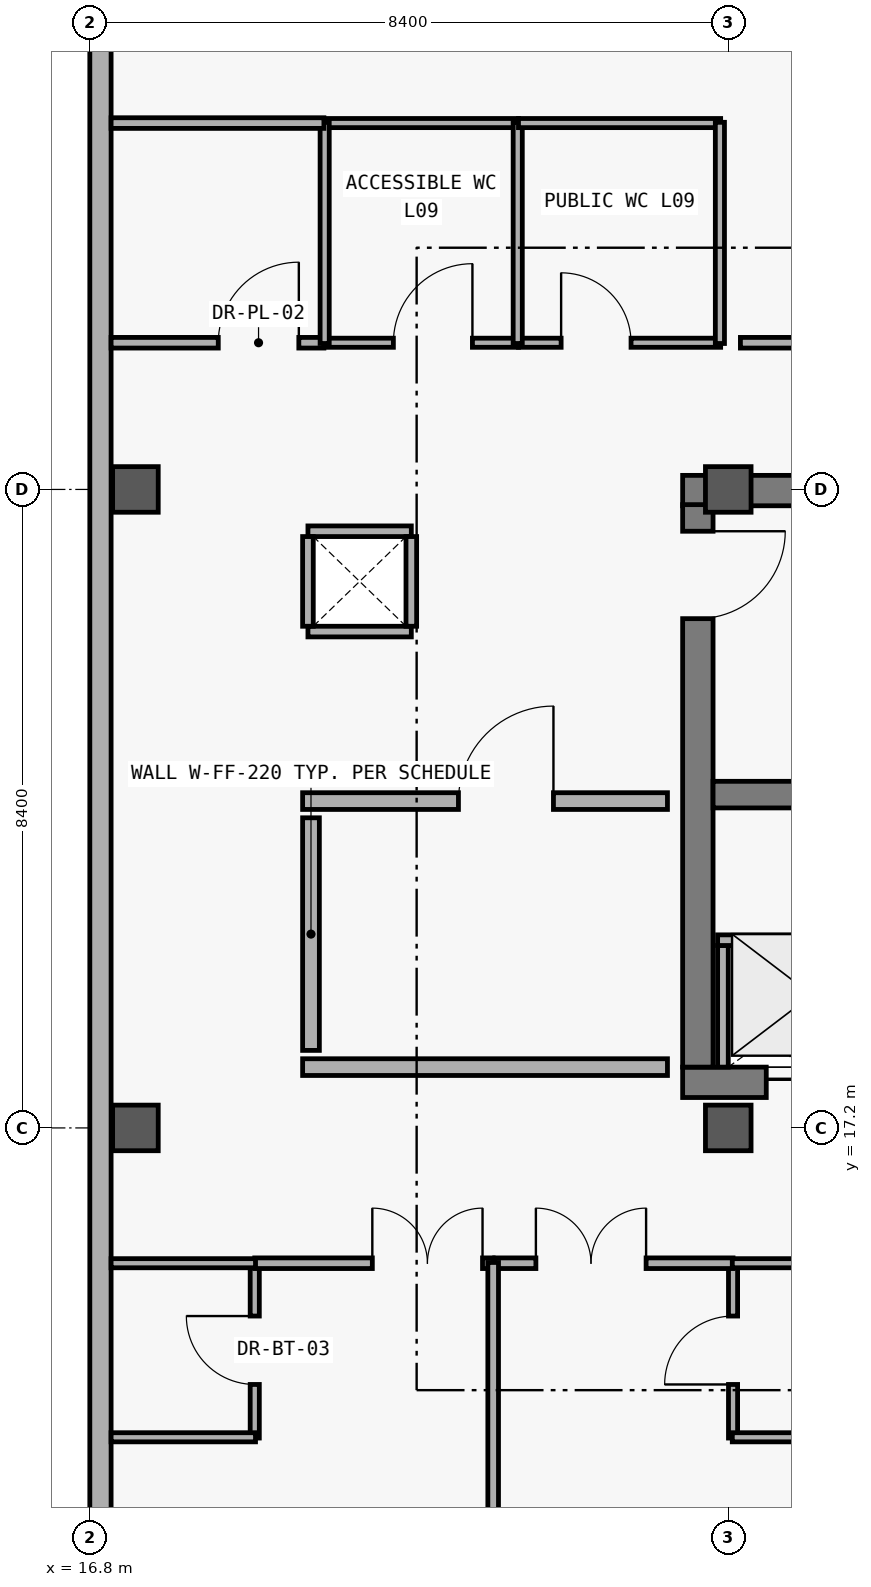
"""IFC4 building model, lengths in metres.
Left out: names, types, materials, properties, quantities, classifications, styles, units other than length and angle.
Written with IfcOpenShell. Run it as: python <this file> out.ifc"""

import sys

from ifc_helpers import new_model, si_unit, direction, frame, frame_2d, origin, origin_2d, place, context, subcontext, project, spatial, rectangle, extrude, element, fill, save


model = new_model("IFC4")
c1 = context("Model", 3, precision=1e-05, world=origin(), true_north=direction((0.0, 1.0)))
c2 = subcontext(c1, "Body", "Model", "MODEL_VIEW")
j1 = project(units=[si_unit("LENGTHUNIT", "METRE"), si_unit("PLANEANGLEUNIT", "RADIAN")], contexts=[c1])
p1 = place(None, origin())
s1 = spatial("IfcSite", under=j1, at=p1, CompositionType="ELEMENT")
p2 = place(p1, origin())
s2 = spatial("IfcBuilding", under=s1, at=p2, CompositionType="ELEMENT")
p3 = place(p2, frame((0.0, 0.0, 37.2)))
s3 = spatial("IfcBuildingStorey", under=s2, at=p3, CompositionType="ELEMENT", Elevation=37.2)
for number, where, z_axis, x_axis in (
    (1, (17.4, 17.2, 0.0), (0.0, 0.0, 1.0), (1.0, 0.0, 0.0)),
    (2, (17.4, 25.6, 0.0), (0.0, 0.0, 1.0), (1.0, 0.0, 0.0)),
    (3, (25.2, 17.2, 0.0), (0.0, 0.0, 1.0), (1.0, 0.0, 0.0)),
    (4, (25.2, 25.6, 0.0), (0.0, 0.0, 1.0), (1.0, 0.0, 0.0)),
):
    element("IfcColumn", number, at=place(p3, frame(where, z_axis=z_axis, x_axis=x_axis)), inside=s3, PredefinedType="COLUMN", context=c2, shape_type="SweptSolid", body=[
        extrude(rectangle(XDim=0.6, YDim=0.6, at=origin_2d()), origin(), (0.0, 0.0, 1.0), 3.6),
    ])
p4 = place(p3, frame((16.94, 8.8, 0.0), z_axis=(0.0, 0.0, 1.0), x_axis=(0.0, 1.0, 0.0)))
e5 = element("IfcWall", 5, at=p4, inside=s3, PredefinedType="SOLIDWALL", context=c2, shape_type="SweptSolid", body=[
    extrude(rectangle(XDim=25.2, YDim=0.28, at=frame_2d((12.6, 0.0))), origin(), (0.0, 0.0, 1.0), 3.34),
])
p5 = place(p4, frame((1.7, 0.0, 0.95)))
e6 = element("IfcOpeningElement", 6, at=p5, cuts=e5, PredefinedType="OPENING", context=c2, shape_type="SweptSolid", body=[
    extrude(rectangle(XDim=1.6, YDim=1.6, at=frame_2d((0.8, 0.8))), frame((0.0, 0.15, 0.0), z_axis=(0.0, -1.0, 0.0), x_axis=(1.0, 0.0, 0.0)), (0.0, 0.0, 1.0), 0.3),
])
p6 = place(p3, frame((24.6, 17.8, 0.0), z_axis=(0.0, 0.0, 1.0), x_axis=(1.0, 0.0, 0.0)))
e7 = element("IfcWall", 7, at=p6, inside=s3, PredefinedType="SHEAR", context=c2, shape_type="SweptSolid", body=[
    extrude(rectangle(XDim=9.2, YDim=0.4, at=frame_2d((4.6, 0.0))), origin(), (0.0, 0.0, 1.0), 3.32),
])
p7 = place(p6, frame((1.1, 0.0, 0.0)))
e8 = element("IfcOpeningElement", 8, at=p7, cuts=e7, PredefinedType="OPENING", context=c2, shape_type="SweptSolid", body=[
    extrude(rectangle(XDim=1.2, YDim=2.2, at=frame_2d((0.6, 1.1))), frame((0.0, 0.21, 0.0), z_axis=(0.0, -1.0, 0.0), x_axis=(1.0, 0.0, 0.0)), (0.0, 0.0, 1.0), 0.42),
])
p8 = place(p6, frame((3.5, 0.0, 0.0)))
e9 = element("IfcOpeningElement", 9, at=p8, cuts=e7, PredefinedType="OPENING", context=c2, shape_type="SweptSolid", body=[
    extrude(rectangle(XDim=1.1, YDim=2.2, at=frame_2d((0.55, 1.1))), frame((0.0, 0.21, 0.0), z_axis=(0.0, -1.0, 0.0), x_axis=(1.0, 0.0, 0.0)), (0.0, 0.0, 1.0), 0.42),
])
p9 = place(p6, frame((5.9, 0.0, 0.0)))
e10 = element("IfcOpeningElement", 10, at=p9, cuts=e7, PredefinedType="OPENING", context=c2, shape_type="SweptSolid", body=[
    extrude(rectangle(XDim=1.1, YDim=2.2, at=frame_2d((0.55, 1.1))), frame((0.0, 0.21, 0.0), z_axis=(0.0, -1.0, 0.0), x_axis=(1.0, 0.0, 0.0)), (0.0, 0.0, 1.0), 0.42),
])
p10 = place(p3, frame((33.8, 25.585, 0.0), z_axis=(0.0, 0.0, 1.0), x_axis=(-1.0, 0.0, 0.0)))
e11 = element("IfcWall", 11, at=p10, inside=s3, PredefinedType="SHEAR", context=c2, shape_type="SweptSolid", body=[
    extrude(rectangle(XDim=9.2, YDim=0.4, at=frame_2d((4.6, 0.0))), origin(), (0.0, 0.0, 1.0), 3.32),
])
p11 = place(p3, frame((24.8, 25.4, 0.0), z_axis=(0.0, 0.0, 1.0), x_axis=(0.0, -1.0, 0.0)))
e12 = element("IfcWall", 12, at=p11, inside=s3, PredefinedType="SHEAR", context=c2, shape_type="SweptSolid", body=[
    extrude(rectangle(XDim=7.4, YDim=0.4, at=frame_2d((3.7, 0.0))), origin(), (0.0, 0.0, 1.0), 3.32),
])
p12 = place(p11, frame((0.35, 0.0, 0.0)))
e13 = element("IfcOpeningElement", 13, at=p12, cuts=e12, PredefinedType="OPENING", context=c2, shape_type="SweptSolid", body=[
    extrude(rectangle(XDim=1.15, YDim=2.2, at=frame_2d((0.575, 1.1))), frame((0.0, 0.21, 0.0), z_axis=(0.0, -1.0, 0.0), x_axis=(1.0, 0.0, 0.0)), (0.0, 0.0, 1.0), 0.42),
])
p13 = place(p3, frame((25.0, 21.585, 0.0), z_axis=(0.0, 0.0, 1.0), x_axis=(1.0, 0.0, 0.0)))
e14 = element("IfcWall", 14, at=p13, inside=s3, PredefinedType="SHEAR", context=c2, shape_type="SweptSolid", body=[
    extrude(rectangle(XDim=8.4, YDim=0.35, at=frame_2d((4.2, 0.0))), origin(), (0.0, 0.0, 1.0), 3.32),
])
p14 = place(p3, frame((25.13, 18.0, 0.0), z_axis=(0.0, 0.0, 1.0), x_axis=(0.0, 1.0, 0.0)))
e15 = element("IfcWall", 15, at=p14, inside=s3, PredefinedType="PARTITIONING", context=c2, shape_type="SweptSolid", body=[
    extrude(rectangle(XDim=1.6, YDim=0.14, at=frame_2d((0.8, 0.0))), origin(), (0.0, 0.0, 1.0), 2.47),
])
p15 = place(p3, frame((25.06, 19.67, 0.0), z_axis=(0.0, 0.0, 1.0), x_axis=(1.0, 0.0, 0.0)))
e16 = element("IfcWall", 16, at=p15, inside=s3, PredefinedType="PARTITIONING", context=c2, shape_type="SweptSolid", body=[
    extrude(rectangle(XDim=7.18, YDim=0.14, at=frame_2d((3.59, 0.0))), origin(), (0.0, 0.0, 1.0), 2.47),
])
p16 = place(p3, frame((19.6, 18.0, 0.0), z_axis=(0.0, 0.0, 1.0), x_axis=(1.0, 0.0, 0.0)))
e17 = element("IfcWall", 17, at=p16, inside=s3, PredefinedType="SOLIDWALL", context=c2, shape_type="SweptSolid", body=[
    extrude(rectangle(XDim=4.8, YDim=0.22, at=frame_2d((2.4, 0.0))), origin(), (0.0, 0.0, 1.0), 2.47),
])
p17 = place(p3, frame((19.6, 21.5, 0.0), z_axis=(0.0, 0.0, 1.0), x_axis=(1.0, 0.0, 0.0)))
e18 = element("IfcWall", 18, at=p17, inside=s3, PredefinedType="SOLIDWALL", context=c2, shape_type="SweptSolid", body=[
    extrude(rectangle(XDim=4.8, YDim=0.22, at=frame_2d((2.4, 0.0))), origin(), (0.0, 0.0, 1.0), 2.47),
])
p18 = place(p17, frame((2.05, 0.0, 0.0)))
e19 = element("IfcOpeningElement", 19, at=p18, cuts=e18, PredefinedType="OPENING", context=c2, shape_type="SweptSolid", body=[
    extrude(rectangle(XDim=1.25, YDim=2.2, at=frame_2d((0.625, 1.1))), frame((0.0, 0.12, 0.0), z_axis=(0.0, -1.0, 0.0), x_axis=(1.0, 0.0, 0.0)), (0.0, 0.0, 1.0), 0.24),
])
p19 = place(p3, frame((19.71, 18.22, 0.0), z_axis=(0.0, 0.0, 1.0), x_axis=(0.0, 1.0, 0.0)))
e20 = element("IfcWall", 20, at=p19, inside=s3, PredefinedType="SOLIDWALL", context=c2, shape_type="SweptSolid", body=[
    extrude(rectangle(XDim=3.06, YDim=0.22, at=frame_2d((1.53, 0.0))), origin(), (0.0, 0.0, 1.0), 2.47),
])
p20 = place(p3, frame((18.97, 13.12, 0.0), z_axis=(0.0, 0.0, 1.0), x_axis=(0.0, 1.0, 0.0)))
e21 = element("IfcWall", 21, at=p20, inside=s3, PredefinedType="PARTITIONING", context=c2, shape_type="SweptSolid", body=[
    extrude(rectangle(XDim=2.31, YDim=0.12, at=frame_2d((1.155, 0.0))), origin(), (0.0, 0.0, 1.0), 2.48),
])
p21 = place(p20, frame((0.705, 0.0, 0.0)))
e22 = element("IfcOpeningElement", 22, at=p21, cuts=e21, PredefinedType="OPENING", context=c2, shape_type="SweptSolid", body=[
    extrude(rectangle(XDim=0.9, YDim=2.18, at=frame_2d((0.45, 1.09))), frame((0.0, 0.07, 0.0), z_axis=(0.0, -1.0, 0.0), x_axis=(1.0, 0.0, 0.0)), (0.0, 0.0, 1.0), 0.14),
])
p22 = place(p3, frame((25.263, 13.12, 0.0), z_axis=(0.0, 0.0, 1.0), x_axis=(0.0, 1.0, 0.0)))
e23 = element("IfcWall", 23, at=p22, inside=s3, PredefinedType="PARTITIONING", context=c2, shape_type="SweptSolid", body=[
    extrude(rectangle(XDim=2.31, YDim=0.12, at=frame_2d((1.155, 0.0))), origin(), (0.0, 0.0, 1.0), 2.48),
])
p23 = place(p22, frame((0.705, 0.0, 0.0)))
e24 = element("IfcOpeningElement", 24, at=p23, cuts=e23, PredefinedType="OPENING", context=c2, shape_type="SweptSolid", body=[
    extrude(rectangle(XDim=0.9, YDim=2.18, at=frame_2d((0.45, 1.09))), frame((0.0, 0.07, 0.0), z_axis=(0.0, -1.0, 0.0), x_axis=(1.0, 0.0, 0.0)), (0.0, 0.0, 1.0), 0.14),
])
p24 = place(p3, frame((19.88, 27.53, 0.0), z_axis=(0.0, 0.0, 1.0), x_axis=(1.0, 0.0, 0.0)))
e25 = element("IfcWall", 25, at=p24, inside=s3, PredefinedType="PARTITIONING", context=c2, shape_type="SweptSolid", body=[
    extrude(rectangle(XDim=2.56, YDim=0.12, at=frame_2d((1.28, 0.0))), origin(), (0.0, 0.0, 1.0), 2.48),
])
p25 = place(p24, frame((0.914, 0.0, 0.0)))
e26 = element("IfcOpeningElement", 26, at=p25, cuts=e25, PredefinedType="OPENING", context=c2, shape_type="SweptSolid", body=[
    extrude(rectangle(XDim=1.04, YDim=2.15, at=frame_2d((0.52, 1.075))), frame((0.0, 0.07, 0.0), z_axis=(0.0, -1.0, 0.0), x_axis=(1.0, 0.0, 0.0)), (0.0, 0.0, 1.0), 0.14),
])
p26 = place(p3, frame((22.44, 27.53, 0.0), z_axis=(0.0, 0.0, 1.0), x_axis=(1.0, 0.0, 0.0)))
e27 = element("IfcWall", 27, at=p26, inside=s3, PredefinedType="PARTITIONING", context=c2, shape_type="SweptSolid", body=[
    extrude(rectangle(XDim=2.66, YDim=0.12, at=frame_2d((1.33, 0.0))), origin(), (0.0, 0.0, 1.0), 2.48),
])
p27 = place(p26, frame((0.561, 0.0, 0.0)))
e28 = element("IfcOpeningElement", 28, at=p27, cuts=e27, PredefinedType="OPENING", context=c2, shape_type="SweptSolid", body=[
    extrude(rectangle(XDim=0.92, YDim=2.15, at=frame_2d((0.46, 1.075))), frame((0.0, 0.07, 0.0), z_axis=(0.0, -1.0, 0.0), x_axis=(1.0, 0.0, 0.0)), (0.0, 0.0, 1.0), 0.14),
])
p28 = place(p3, frame((18.97, 15.42, 0.0), z_axis=(0.0, 0.0, 1.0), x_axis=(1.0, 0.0, 0.0)))
e29 = element("IfcWall", 29, at=p28, inside=s3, PredefinedType="PARTITIONING", context=c2, shape_type="SweptSolid", body=[
    extrude(rectangle(XDim=3.137, YDim=0.14, at=frame_2d((1.568, 0.0))), origin(), (0.0, 0.0, 1.0), 2.48),
])
p29 = place(p28, frame((1.547, 0.0, 0.0)))
e30 = element("IfcOpeningElement", 30, at=p29, cuts=e29, PredefinedType="OPENING", context=c2, shape_type="SweptSolid", body=[
    extrude(rectangle(XDim=1.45, YDim=2.3, at=frame_2d((0.725, 1.15))), frame((0.0, 0.08, 0.0), z_axis=(0.0, -1.0, 0.0), x_axis=(1.0, 0.0, 0.0)), (0.0, 0.0, 1.0), 0.16),
])
p30 = place(p3, frame((22.127, 15.42, 0.0), z_axis=(0.0, 0.0, 1.0), x_axis=(1.0, 0.0, 0.0)))
e31 = element("IfcWall", 31, at=p30, inside=s3, PredefinedType="PARTITIONING", context=c2, shape_type="SweptSolid", body=[
    extrude(rectangle(XDim=3.136, YDim=0.14, at=frame_2d((1.568, 0.0))), origin(), (0.0, 0.0, 1.0), 2.48),
])
p31 = place(p30, frame((0.542, 0.0, 0.0)))
e32 = element("IfcOpeningElement", 32, at=p31, cuts=e31, PredefinedType="OPENING", context=c2, shape_type="SweptSolid", body=[
    extrude(rectangle(XDim=1.45, YDim=2.3, at=frame_2d((0.725, 1.15))), frame((0.0, 0.08, 0.0), z_axis=(0.0, -1.0, 0.0), x_axis=(1.0, 0.0, 0.0)), (0.0, 0.0, 1.0), 0.16),
])
p32 = place(p3, frame((17.08, 27.53, 0.0), z_axis=(0.0, 0.0, 1.0), x_axis=(1.0, 0.0, 0.0)))
e33 = element("IfcWall", 33, at=p32, inside=s3, PredefinedType="PARTITIONING", context=c2, shape_type="SweptSolid", body=[
    extrude(rectangle(XDim=2.8, YDim=0.14, at=frame_2d((1.4, 0.0))), origin(), (0.0, 0.0, 1.0), 2.48),
])
p33 = place(p32, frame((1.41, 0.0, 0.0)))
e34 = element("IfcOpeningElement", 34, at=p33, cuts=e33, PredefinedType="OPENING", context=c2, shape_type="SweptSolid", body=[
    extrude(rectangle(XDim=1.06, YDim=2.2, at=frame_2d((0.53, 1.1))), frame((0.0, 0.08, 0.0), z_axis=(0.0, -1.0, 0.0), x_axis=(1.0, 0.0, 0.0)), (0.0, 0.0, 1.0), 0.16),
])
p34 = place(p3, frame((25.36, 27.53, 0.0), z_axis=(0.0, 0.0, 1.0), x_axis=(1.0, 0.0, 0.0)))
e35 = element("IfcWall", 35, at=p34, inside=s3, PredefinedType="PARTITIONING", context=c2, shape_type="SweptSolid", body=[
    extrude(rectangle(XDim=2.61, YDim=0.14, at=frame_2d((1.305, 0.0))), origin(), (0.0, 0.0, 1.0), 2.48),
])
p35 = place(p34, frame((1.077, 0.0, 0.0)))
e36 = element("IfcOpeningElement", 36, at=p35, cuts=e35, PredefinedType="OPENING", context=c2, shape_type="SweptSolid", body=[
    extrude(rectangle(XDim=1.08, YDim=2.25, at=frame_2d((0.54, 1.125))), frame((0.0, 0.08, 0.0), z_axis=(0.0, -1.0, 0.0), x_axis=(1.0, 0.0, 0.0)), (0.0, 0.0, 1.0), 0.16),
])
for number, where, z_axis, x_axis in (
    (37, (17.08, 13.13, 0.0), (0.0, 0.0, 1.0), (1.0, 0.0, 0.0)),
    (38, (17.08, 15.42, 0.0), (0.0, 0.0, 1.0), (1.0, 0.0, 0.0)),
):
    element("IfcWall", number, at=place(p3, frame(where, z_axis=z_axis, x_axis=x_axis)), inside=s3, PredefinedType="PARTITIONING", context=c2, shape_type="SweptSolid", body=[
        extrude(rectangle(XDim=1.9, YDim=0.12, at=frame_2d((0.95, 0.0))), origin(), (0.0, 0.0, 1.0), 2.48),
    ])
for number, where, z_axis, x_axis in (
    (39, (25.253, 13.13, 0.0), (0.0, 0.0, 1.0), (1.0, 0.0, 0.0)),
    (40, (25.253, 15.42, 0.0), (0.0, 0.0, 1.0), (1.0, 0.0, 0.0)),
):
    element("IfcWall", number, at=place(p3, frame(where, z_axis=z_axis, x_axis=x_axis)), inside=s3, PredefinedType="PARTITIONING", context=c2, shape_type="SweptSolid", body=[
        extrude(rectangle(XDim=1.68, YDim=0.12, at=frame_2d((0.84, 0.0))), origin(), (0.0, 0.0, 1.0), 2.48),
    ])
p36 = place(p3, frame((19.88, 30.42, 0.0), z_axis=(0.0, 0.0, 1.0), x_axis=(1.0, 0.0, 0.0)))
e41 = element("IfcWall", 41, at=p36, inside=s3, PredefinedType="PARTITIONING", context=c2, shape_type="SweptSolid", body=[
    extrude(rectangle(XDim=2.56, YDim=0.12, at=frame_2d((1.28, 0.0))), origin(), (0.0, 0.0, 1.0), 2.48),
])
for number, where, z_axis, x_axis in (
    (42, (19.89, 27.52, 0.0), (0.0, 0.0, 1.0), (0.0, 1.0, 0.0)),
    (43, (22.43, 27.52, 0.0), (0.0, 0.0, 1.0), (0.0, 1.0, 0.0)),
):
    element("IfcWall", number, at=place(p3, frame(where, z_axis=z_axis, x_axis=x_axis)), inside=s3, PredefinedType="PARTITIONING", context=c2, shape_type="SweptSolid", body=[
        extrude(rectangle(XDim=2.91, YDim=0.12, at=frame_2d((1.455, 0.0))), origin(), (0.0, 0.0, 1.0), 2.48),
    ])
p37 = place(p3, frame((22.44, 30.42, 0.0), z_axis=(0.0, 0.0, 1.0), x_axis=(1.0, 0.0, 0.0)))
e44 = element("IfcWall", 44, at=p37, inside=s3, PredefinedType="PARTITIONING", context=c2, shape_type="SweptSolid", body=[
    extrude(rectangle(XDim=2.66, YDim=0.12, at=frame_2d((1.33, 0.0))), origin(), (0.0, 0.0, 1.0), 2.48),
])
p38 = place(p3, frame((25.09, 27.52, 0.0), z_axis=(0.0, 0.0, 1.0), x_axis=(0.0, 1.0, 0.0)))
e45 = element("IfcWall", 45, at=p38, inside=s3, PredefinedType="PARTITIONING", context=c2, shape_type="SweptSolid", body=[
    extrude(rectangle(XDim=2.91, YDim=0.12, at=frame_2d((1.455, 0.0))), origin(), (0.0, 0.0, 1.0), 2.48),
])
p39 = place(p3, frame((22.107, 9.08, 0.0), z_axis=(0.0, 0.0, 1.0), x_axis=(0.0, 1.0, 0.0)))
e46 = element("IfcWall", 46, at=p39, inside=s3, PredefinedType="PARTITIONING", context=c2, shape_type="SweptSolid", body=[
    extrude(rectangle(XDim=6.35, YDim=0.14, at=frame_2d((3.175, 0.0))), origin(), (0.0, 0.0, 1.0), 2.48),
])
p40 = place(p3, frame((17.08, 30.42, 0.0), z_axis=(0.0, 0.0, 1.0), x_axis=(1.0, 0.0, 0.0)))
e47 = element("IfcWall", 47, at=p40, inside=s3, PredefinedType="PARTITIONING", context=c2, shape_type="SweptSolid", body=[
    extrude(rectangle(XDim=2.8, YDim=0.14, at=frame_2d((1.4, 0.0))), origin(), (0.0, 0.0, 1.0), 2.48),
])
for number, where, z_axis, x_axis in (
    (48, (19.67, 23.73, 0.0), (0.0, 0.0, 1.0), (1.0, 0.0, 0.0)),
    (49, (21.03, 25.05, 0.0), (0.0, 0.0, 1.0), (-1.0, 0.0, 0.0)),
):
    element("IfcWall", number, at=place(p3, frame(where, z_axis=z_axis, x_axis=x_axis)), inside=s3, PredefinedType="PARTITIONING", context=c2, shape_type="SweptSolid", body=[
        extrude(rectangle(XDim=1.36, YDim=0.14, at=frame_2d((0.68, 0.0))), origin(), (0.0, 0.0, 1.0), 2.44),
    ])
for number, where, z_axis, x_axis in (
    (50, (19.67, 24.98, 0.0), (0.0, 0.0, 1.0), (0.0, -1.0, 0.0)),
    (51, (21.03, 23.8, 0.0), (0.0, 0.0, 1.0), (0.0, 1.0, 0.0)),
):
    element("IfcWall", number, at=place(p3, frame(where, z_axis=z_axis, x_axis=x_axis)), inside=s3, PredefinedType="PARTITIONING", context=c2, shape_type="SweptSolid", body=[
        extrude(rectangle(XDim=1.18, YDim=0.14, at=frame_2d((0.59, 0.0))), origin(), (0.0, 0.0, 1.0), 2.44),
    ])
p41 = place(p12, origin())
e52 = element("IfcDoor", 52, at=p41, inside=s3, OperationType="SINGLE_SWING_LEFT", PredefinedType="DOOR", context=c2, shape_type="SweptSolid", body=[
    extrude(rectangle(XDim=1.15, YDim=2.2, at=frame_2d((0.575, 1.1))), frame((0.0, 0.025, 0.0), z_axis=(0.0, -1.0, 0.0), x_axis=(1.0, 0.0, 0.0)), (0.0, 0.0, 1.0), 0.05),
])
fill(e13, e52)
p42 = place(p7, origin())
e53 = element("IfcDoor", 53, at=p42, inside=s3, OperationType="DOUBLE_DOOR_SLIDING", PredefinedType="DOOR", context=c2, shape_type="SweptSolid", body=[
    extrude(rectangle(XDim=1.2, YDim=2.2, at=frame_2d((0.6, 1.1))), frame((0.0, 0.025, 0.0), z_axis=(0.0, -1.0, 0.0), x_axis=(1.0, 0.0, 0.0)), (0.0, 0.0, 1.0), 0.05),
])
fill(e8, e53)
p43 = place(p18, origin())
e54 = element("IfcDoor", 54, at=p43, inside=s3, OperationType="SINGLE_SWING_RIGHT", PredefinedType="DOOR", context=c2, shape_type="SweptSolid", body=[
    extrude(rectangle(XDim=1.25, YDim=2.2, at=frame_2d((0.625, 1.1))), frame((0.0, 0.025, 0.0), z_axis=(0.0, -1.0, 0.0), x_axis=(1.0, 0.0, 0.0)), (0.0, 0.0, 1.0), 0.05),
])
fill(e19, e54)
p44 = place(p21, origin())
e55 = element("IfcDoor", 55, at=p44, inside=s3, OperationType="SINGLE_SWING_RIGHT", PredefinedType="DOOR", context=c2, shape_type="SweptSolid", body=[
    extrude(rectangle(XDim=0.9, YDim=2.18, at=frame_2d((0.45, 1.09))), frame((0.0, 0.025, 0.0), z_axis=(0.0, -1.0, 0.0), x_axis=(1.0, 0.0, 0.0)), (0.0, 0.0, 1.0), 0.05),
])
fill(e22, e55)
p45 = place(p23, origin())
e56 = element("IfcDoor", 56, at=p45, inside=s3, OperationType="SINGLE_SWING_LEFT", PredefinedType="DOOR", context=c2, shape_type="SweptSolid", body=[
    extrude(rectangle(XDim=0.9, YDim=2.18, at=frame_2d((0.45, 1.09))), frame((0.0, 0.025, 0.0), z_axis=(0.0, -1.0, 0.0), x_axis=(1.0, 0.0, 0.0)), (0.0, 0.0, 1.0), 0.05),
])
fill(e24, e56)
p46 = place(p25, origin())
e57 = element("IfcDoor", 57, at=p46, inside=s3, OperationType="SINGLE_SWING_RIGHT", PredefinedType="DOOR", context=c2, shape_type="SweptSolid", body=[
    extrude(rectangle(XDim=1.04, YDim=2.15, at=frame_2d((0.52, 1.075))), frame((0.0, 0.025, 0.0), z_axis=(0.0, -1.0, 0.0), x_axis=(1.0, 0.0, 0.0)), (0.0, 0.0, 1.0), 0.05),
])
fill(e26, e57)
p47 = place(p27, origin())
e58 = element("IfcDoor", 58, at=p47, inside=s3, OperationType="SINGLE_SWING_LEFT", PredefinedType="DOOR", context=c2, shape_type="SweptSolid", body=[
    extrude(rectangle(XDim=0.92, YDim=2.15, at=frame_2d((0.46, 1.075))), frame((0.0, 0.025, 0.0), z_axis=(0.0, -1.0, 0.0), x_axis=(1.0, 0.0, 0.0)), (0.0, 0.0, 1.0), 0.05),
])
fill(e28, e58)
p48 = place(p29, origin())
e59 = element("IfcDoor", 59, at=p48, inside=s3, OperationType="DOUBLE_DOOR_SINGLE_SWING", PredefinedType="DOOR", context=c2, shape_type="SweptSolid", body=[
    extrude(rectangle(XDim=1.45, YDim=2.3, at=frame_2d((0.725, 1.15))), frame((0.0, 0.025, 0.0), z_axis=(0.0, -1.0, 0.0), x_axis=(1.0, 0.0, 0.0)), (0.0, 0.0, 1.0), 0.05),
])
fill(e30, e59)
p49 = place(p31, origin())
e60 = element("IfcDoor", 60, at=p49, inside=s3, OperationType="DOUBLE_DOOR_SINGLE_SWING", PredefinedType="DOOR", context=c2, shape_type="SweptSolid", body=[
    extrude(rectangle(XDim=1.45, YDim=2.3, at=frame_2d((0.725, 1.15))), frame((0.0, 0.025, 0.0), z_axis=(0.0, -1.0, 0.0), x_axis=(1.0, 0.0, 0.0)), (0.0, 0.0, 1.0), 0.05),
])
fill(e32, e60)
p50 = place(p33, origin())
e61 = element("IfcDoor", 61, at=p50, inside=s3, OperationType="SINGLE_SWING_RIGHT", PredefinedType="DOOR", context=c2, shape_type="SweptSolid", body=[
    extrude(rectangle(XDim=1.06, YDim=2.2, at=frame_2d((0.53, 1.1))), frame((0.0, 0.025, 0.0), z_axis=(0.0, -1.0, 0.0), x_axis=(1.0, 0.0, 0.0)), (0.0, 0.0, 1.0), 0.05),
])
fill(e34, e61)
save(model, sys.argv[1])
